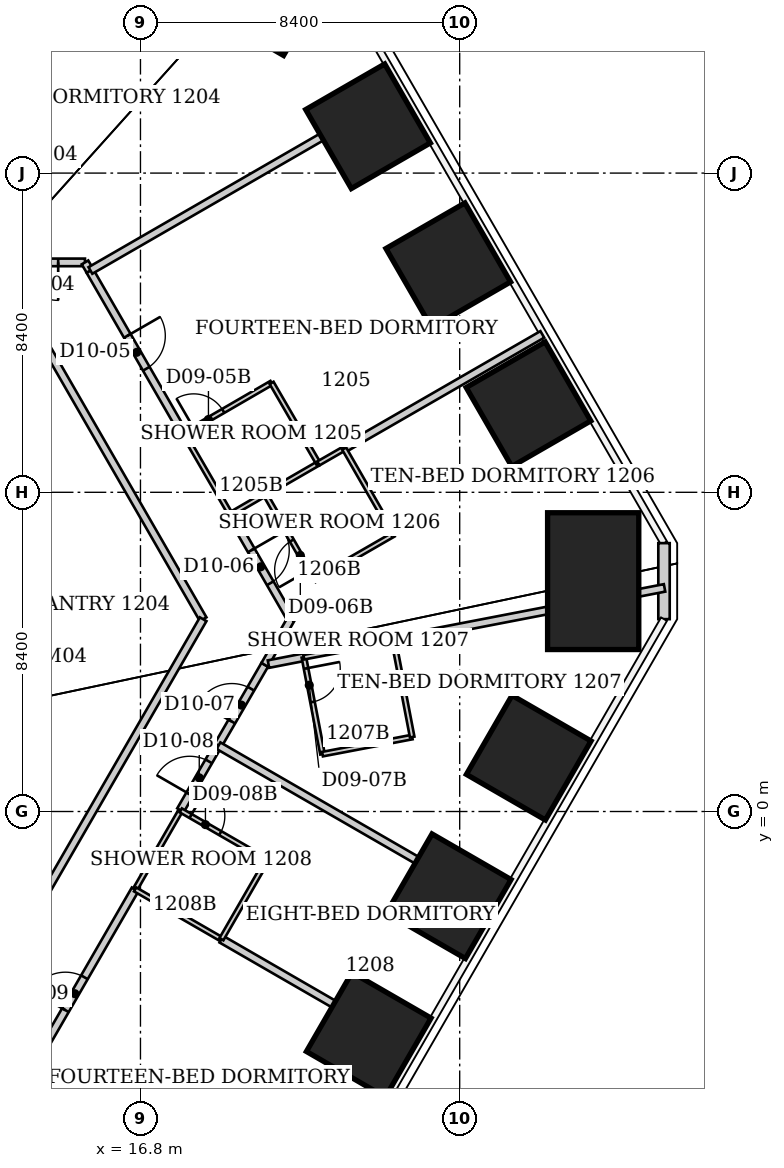
"""IFC4 building model, lengths in metres.
Left out: names, types, materials, properties, quantities, classifications, styles, units other than length and angle.
Written with IfcOpenShell. Run it as: python <this file> out.ifc"""

import sys

from ifc_helpers import new_model, si_unit, direction, frame, frame_2d, origin, origin_2d, place, context, subcontext, project, spatial, rectangle, extrude, clip, halfspace, element, fill, save


model = new_model("IFC4")
c1 = context("Model", 3, precision=1e-05, world=origin(), true_north=direction((0.0, 1.0)))
c2 = subcontext(c1, "Body", "Model", "MODEL_VIEW")
j1 = project(units=[si_unit("LENGTHUNIT", "METRE"), si_unit("PLANEANGLEUNIT", "RADIAN")], contexts=[c1])
p1 = place(None, origin())
s1 = spatial("IfcSite", under=j1, at=p1, CompositionType="ELEMENT")
p2 = place(p1, origin())
s2 = spatial("IfcBuilding", under=s1, at=p2, CompositionType="ELEMENT")
p3 = place(p2, frame((0.0, 0.0, 53.4)))
s3 = spatial("IfcBuildingStorey", under=s2, at=p3, CompositionType="ELEMENT", Elevation=53.4)
p4 = place(p3, frame((19.606, 21.835, 0.0), z_axis=(0.0, 0.0, 1.0), x_axis=(0.5, 0.866025403784, 0.0)))
e1 = element("IfcColumn", 1, at=p4, inside=s3, PredefinedType="COLUMN", context=c2, shape_type="SweptSolid", body=[
    clip(extrude(rectangle(XDim=2.4, YDim=3.6, at=origin_2d()), origin(), (0.0, 0.0, 1.0), 3.726), halfspace(frame((0.0, 0.0, 3.64)), False)),
])
p5 = place(p3, frame((22.788, 18.032, 0.0), z_axis=(0.0, 0.0, 1.0), x_axis=(0.866025403784, 0.5, 0.0)))
e2 = element("IfcColumn", 2, at=p5, inside=s3, PredefinedType="COLUMN", context=c2, shape_type="SweptSolid", body=[
    clip(extrude(rectangle(XDim=2.4, YDim=2.4, at=origin_2d()), origin(), (0.0, 0.0, 1.0), 3.737), halfspace(frame((0.0, 0.0, 3.64)), False)),
])
p6 = place(p3, frame((24.899, 14.375, 0.0), z_axis=(0.0, 0.0, 1.0), x_axis=(0.866025403784, 0.5, 0.0)))
e3 = element("IfcColumn", 3, at=p6, inside=s3, PredefinedType="COLUMN", context=c2, shape_type="SweptSolid", body=[
    clip(extrude(rectangle(XDim=2.4, YDim=2.4, at=origin_2d()), origin(), (0.0, 0.0, 1.0), 3.745), halfspace(frame((0.0, 0.0, 3.64)), False)),
])
p7 = place(p3, frame((27.01, 10.719, 0.0), z_axis=(0.0, 0.0, 1.0), x_axis=(0.866025403784, 0.5, 0.0)))
e4 = element("IfcColumn", 4, at=p7, inside=s3, PredefinedType="COLUMN", context=c2, shape_type="SweptSolid", body=[
    clip(extrude(rectangle(XDim=2.4, YDim=2.4, at=origin_2d()), origin(), (0.0, 0.0, 1.0), 3.737), halfspace(frame((0.0, 0.0, 3.64)), False)),
])
p8 = place(p3, frame((28.713, 6.062, 0.0), z_axis=(0.0, 0.0, 1.0), x_axis=(1.0, 0.0, 0.0)))
e5 = element("IfcColumn", 5, at=p8, inside=s3, PredefinedType="COLUMN", context=c2, shape_type="SweptSolid", body=[
    clip(extrude(rectangle(XDim=2.4, YDim=3.6, at=origin_2d()), origin(), (0.0, 0.0, 1.0), 3.726), halfspace(frame((0.0, 0.0, 3.64)), False)),
])
p9 = place(p3, frame((27.016, 1.416, 0.0), z_axis=(0.0, 0.0, 1.0), x_axis=(0.866025403784, -0.5, 0.0)))
e6 = element("IfcColumn", 6, at=p9, inside=s3, PredefinedType="COLUMN", context=c2, shape_type="SweptSolid", body=[
    clip(extrude(rectangle(XDim=2.4, YDim=2.4, at=origin_2d()), origin(), (0.0, 0.0, 1.0), 3.728), halfspace(frame((0.0, 0.0, 3.64)), False)),
])
p10 = place(p3, frame((24.911, -2.23, 0.0), z_axis=(0.0, 0.0, 1.0), x_axis=(0.866025403784, -0.5, 0.0)))
e7 = element("IfcColumn", 7, at=p10, inside=s3, PredefinedType="COLUMN", context=c2, shape_type="SweptSolid", body=[
    clip(extrude(rectangle(XDim=2.4, YDim=2.4, at=origin_2d()), origin(), (0.0, 0.0, 1.0), 3.736), halfspace(frame((0.0, 0.0, 3.64)), False)),
])
p11 = place(p3, frame((22.806, -5.875, 0.0), z_axis=(0.0, 0.0, 1.0), x_axis=(0.866025403784, -0.5, 0.0)))
e8 = element("IfcColumn", 8, at=p11, inside=s3, PredefinedType="COLUMN", context=c2, shape_type="SweptSolid", body=[
    clip(extrude(rectangle(XDim=2.4, YDim=2.4, at=origin_2d()), origin(), (0.0, 0.0, 1.0), 3.744), halfspace(frame((0.0, 0.0, 3.64)), False)),
])
p12 = place(p3, frame((30.576, 7.062, 0.0), z_axis=(0.0, 0.0, 1.0), x_axis=(0.0, -1.0, 0.0)))
e9 = element("IfcWall", 9, at=p12, inside=s3, PredefinedType="SOLIDWALL", context=c2, shape_type="SweptSolid", body=[
    extrude(rectangle(XDim=2.0, YDim=0.3, at=frame_2d((1.0, 0.0))), origin(), (0.0, 0.0, 1.0), 3.64),
])
p13 = place(p3, frame((13.49, -7.54, 0.0), z_axis=(0.0, 0.0, 1.0), x_axis=(0.500032479136, 0.866006651134, 0.0)))
e10 = element("IfcWall", 10, at=p13, inside=s3, PredefinedType="PARTITIONING", context=c2, shape_type="SweptSolid", body=[
    extrude(rectangle(XDim=6.339, YDim=0.2, at=frame_2d((3.17, 0.0))), origin(), (0.0, 0.0, 1.0), 3.64),
])
p14 = place(p13, frame((2.67, 0.0, 0.0)))
e11 = element("IfcOpeningElement", 11, at=p14, cuts=e10, PredefinedType="OPENING", context=c2, shape_type="SweptSolid", body=[
    extrude(rectangle(XDim=1.0, YDim=2.13, at=frame_2d((0.5, 1.065))), frame((0.0, 0.1, 0.0), z_axis=(0.0, -1.0, 0.0), x_axis=(1.0, 0.0, 0.0)), (0.0, 0.0, 1.0), 0.2),
])
p15 = place(p3, frame((14.19, 12.45, 0.0), z_axis=(0.0, 0.0, 1.0), x_axis=(0.499424260127, -0.866357552282, 0.0)))
e12 = element("IfcWall", 12, at=p15, inside=s3, PredefinedType="PARTITIONING", context=c2, shape_type="SweptSolid", body=[
    extrude(rectangle(XDim=8.53, YDim=0.2, at=frame_2d((4.265, 0.0))), origin(), (0.0, 0.0, 1.0), 3.64),
])
p16 = place(p3, frame((15.34, 14.45, 0.0), z_axis=(0.0, 0.0, 1.0), x_axis=(-1.0, 0.0, 0.0)))
e13 = element("IfcWall", 13, at=p16, inside=s3, PredefinedType="PARTITIONING", context=c2, shape_type="SweptSolid", body=[
    extrude(rectangle(XDim=4.41, YDim=0.2, at=frame_2d((2.205, 0.0))), origin(), (0.0, 0.0, 1.0), 3.64),
])
p17 = place(p16, frame((0.705, 0.0, 0.0)))
e14 = element("IfcOpeningElement", 14, at=p17, cuts=e13, PredefinedType="OPENING", context=c2, shape_type="SweptSolid", body=[
    extrude(rectangle(XDim=1.0, YDim=2.13, at=frame_2d((0.5, 1.065))), frame((0.0, 0.1, 0.0), z_axis=(0.0, -1.0, 0.0), x_axis=(1.0, 0.0, 0.0)), (0.0, 0.0, 1.0), 0.2),
])
p18 = place(p3, frame((15.467, 14.229, 0.0), z_axis=(0.0, 0.0, 1.0), x_axis=(0.499491884095, -0.866318565958, 0.0)))
e15 = element("IfcWall", 15, at=p18, inside=s3, PredefinedType="PARTITIONING", context=c2, shape_type="SweptSolid", body=[
    extrude(rectangle(XDim=4.95, YDim=0.2, at=frame_2d((2.475, 0.0))), origin(), (0.0, 0.0, 1.0), 3.64),
])
p19 = place(p18, frame((1.975, 0.0, 0.0)))
e16 = element("IfcOpeningElement", 16, at=p19, cuts=e15, PredefinedType="OPENING", context=c2, shape_type="SweptSolid", body=[
    extrude(rectangle(XDim=1.0, YDim=2.13, at=frame_2d((0.5, 1.065))), frame((0.0, 0.1, 0.0), z_axis=(0.0, -1.0, 0.0), x_axis=(1.0, 0.0, 0.0)), (0.0, 0.0, 1.0), 0.2),
])
p20 = place(p3, frame((15.47, 14.23, 0.0), z_axis=(0.0, 0.0, 1.0), x_axis=(-0.508439495802, 0.861097717514, 0.0)))
e17 = element("IfcWall", 17, at=p20, inside=s3, PredefinedType="PARTITIONING", context=c2, shape_type="SweptSolid", body=[
    extrude(rectangle(XDim=0.255, YDim=0.2, at=frame_2d((0.128, 0.0))), origin(), (0.0, 0.0, 1.0), 3.64),
])
p21 = place(p3, frame((16.66, -2.05, 0.0), z_axis=(0.0, 0.0, 1.0), x_axis=(0.499693115345, 0.866202511239, 0.0)))
e18 = element("IfcWall", 18, at=p21, inside=s3, PredefinedType="PARTITIONING", context=c2, shape_type="SweptSolid", body=[
    extrude(rectangle(XDim=2.401, YDim=0.12, at=frame_2d((1.201, 0.0))), origin(), (0.0, 0.0, 1.0), 3.64),
])
p22 = place(p3, frame((16.66, -2.05, 0.0), z_axis=(0.0, 0.0, 1.0), x_axis=(0.866010296064, -0.500026166427, 0.0)))
e19 = element("IfcWall", 19, at=p22, inside=s3, PredefinedType="PARTITIONING", context=c2, shape_type="SweptSolid", body=[
    extrude(rectangle(XDim=2.621, YDim=0.12, at=frame_2d((1.311, 0.0))), origin(), (0.0, 0.0, 1.0), 3.64),
])
p23 = place(p3, frame((17.854, 0.033, 0.0), z_axis=(0.0, 0.0, 1.0), x_axis=(0.500308553443, 0.865847187067, 0.0)))
e20 = element("IfcWall", 20, at=p23, inside=s3, PredefinedType="PARTITIONING", context=c2, shape_type="SweptSolid", body=[
    extrude(rectangle(XDim=1.971, YDim=0.2, at=frame_2d((0.985, 0.0))), origin(), (0.0, 0.0, 1.0), 3.64),
])
p24 = place(p23, frame((0.485, 0.0, 0.0)))
e21 = element("IfcOpeningElement", 21, at=p24, cuts=e20, PredefinedType="OPENING", context=c2, shape_type="SweptSolid", body=[
    extrude(rectangle(XDim=1.0, YDim=2.13, at=frame_2d((0.5, 1.065))), frame((0.0, 0.1, 0.0), z_axis=(0.0, -1.0, 0.0), x_axis=(1.0, 0.0, 0.0)), (0.0, 0.0, 1.0), 0.2),
])
p25 = place(p3, frame((17.94, 9.94, 0.0), z_axis=(0.0, 0.0, 1.0), x_axis=(0.50162119259, -0.865087382375, 0.0)))
e22 = element("IfcWall", 22, at=p25, inside=s3, PredefinedType="PARTITIONING", context=c2, shape_type="SweptSolid", body=[
    extrude(rectangle(XDim=2.451, YDim=0.12, at=frame_2d((1.226, 0.0))), origin(), (0.0, 0.0, 1.0), 3.64),
])
p26 = place(p3, frame((18.45, 5.06, 0.0), z_axis=(0.0, 0.0, 1.0), x_axis=(-0.499910730718, -0.866076937294, 0.0)))
e23 = element("IfcWall", 23, at=p26, inside=s3, PredefinedType="PARTITIONING", context=c2, shape_type="SweptSolid", body=[
    extrude(rectangle(XDim=14.593, YDim=0.2, at=frame_2d((7.296, 0.0))), origin(), (0.0, 0.0, 1.0), 3.64),
])
p27 = place(p3, frame((18.84, 1.74, 0.0), z_axis=(0.0, 0.0, 1.0), x_axis=(0.501813488763, 0.864975850817, 0.0)))
e24 = element("IfcWall", 24, at=p27, inside=s3, PredefinedType="PARTITIONING", context=c2, shape_type="SweptSolid", body=[
    extrude(rectangle(XDim=2.451, YDim=0.2, at=frame_2d((1.226, 0.0))), origin(), (0.0, 0.0, 1.0), 3.64),
])
p28 = place(p27, frame((0.726, 0.0, 0.0)))
e25 = element("IfcOpeningElement", 25, at=p28, cuts=e24, PredefinedType="OPENING", context=c2, shape_type="SweptSolid", body=[
    extrude(rectangle(XDim=1.0, YDim=2.13, at=frame_2d((0.5, 1.065))), frame((0.0, 0.1, 0.0), z_axis=(0.0, -1.0, 0.0), x_axis=(1.0, 0.0, 0.0)), (0.0, 0.0, 1.0), 0.2),
])
p29 = place(p3, frame((18.93, -3.361, 0.0), z_axis=(0.0, 0.0, 1.0), x_axis=(0.865985044037, -0.500069898618, 0.0)))
e26 = element("IfcWall", 26, at=p29, inside=s3, PredefinedType="PARTITIONING", context=c2, shape_type="SweptSolid", body=[
    extrude(rectangle(XDim=5.758, YDim=0.2, at=frame_2d((2.879, 0.0))), origin(), (0.0, 0.0, 1.0), 3.64),
])
p30 = place(p3, frame((18.93, -3.36, 0.0), z_axis=(0.0, 0.0, 1.0), x_axis=(0.499693115345, 0.866202511239, 0.0)))
e27 = element("IfcWall", 27, at=p30, inside=s3, PredefinedType="PARTITIONING", context=c2, shape_type="SweptSolid", body=[
    extrude(rectangle(XDim=2.401, YDim=0.12, at=frame_2d((1.201, 0.0))), origin(), (0.0, 0.0, 1.0), 3.64),
])
p31 = place(p3, frame((19.17, 7.82, 0.0), z_axis=(0.0, 0.0, 1.0), x_axis=(0.864148586513, 0.503236743916, 0.0)))
e28 = element("IfcWall", 28, at=p31, inside=s3, PredefinedType="PARTITIONING", context=c2, shape_type="SweptSolid", body=[
    extrude(rectangle(XDim=1.053, YDim=0.12, at=frame_2d((0.527, 0.0))), origin(), (0.0, 0.0, 1.0), 3.64),
])
p32 = place(p3, frame((19.169, 7.82, 0.0), z_axis=(0.0, 0.0, 1.0), x_axis=(0.499379570303, -0.866383312838, 0.0)))
e29 = element("IfcWall", 29, at=p32, inside=s3, PredefinedType="PARTITIONING", context=c2, shape_type="SweptSolid", body=[
    extrude(rectangle(XDim=3.185, YDim=0.2, at=frame_2d((1.593, 0.0))), origin(), (0.0, 0.0, 1.0), 3.64),
])
p33 = place(p32, frame((1.093, 0.0, 0.0)))
e30 = element("IfcOpeningElement", 30, at=p33, cuts=e29, PredefinedType="OPENING", context=c2, shape_type="SweptSolid", body=[
    extrude(rectangle(XDim=1.0, YDim=2.13, at=frame_2d((0.5, 1.065))), frame((0.0, 0.1, 0.0), z_axis=(0.0, -1.0, 0.0), x_axis=(1.0, 0.0, 0.0)), (0.0, 0.0, 1.0), 0.2),
])
p34 = place(p3, frame((20.07, 3.86, 0.0), z_axis=(0.0, 0.0, 1.0), x_axis=(0.49845455473, 0.866915830325, 0.0)))
e31 = element("IfcWall", 31, at=p34, inside=s3, PredefinedType="PARTITIONING", context=c2, shape_type="SweptSolid", body=[
    extrude(rectangle(XDim=1.384, YDim=0.2, at=frame_2d((0.692, 0.0))), origin(), (0.0, 0.0, 1.0), 3.64),
])
p35 = place(p3, frame((20.08, 8.35, 0.0), z_axis=(0.0, 0.0, 1.0), x_axis=(0.498557331759, -0.866856728041, 0.0)))
e32 = element("IfcWall", 32, at=p35, inside=s3, PredefinedType="PARTITIONING", context=c2, shape_type="SweptSolid", body=[
    extrude(rectangle(XDim=2.607, YDim=0.12, at=frame_2d((1.304, 0.0))), origin(), (0.0, 0.0, 1.0), 3.64),
])
p36 = place(p35, frame((1.407, 0.0, 0.0)))
e33 = element("IfcOpeningElement", 33, at=p36, cuts=e32, PredefinedType="OPENING", context=c2, shape_type="SweptSolid", body=[
    extrude(rectangle(XDim=0.9, YDim=2.03, at=frame_2d((0.45, 1.015))), frame((0.0, 0.06, 0.0), z_axis=(0.0, -1.0, 0.0), x_axis=(1.0, 0.0, 0.0)), (0.0, 0.0, 1.0), 0.12),
])
p37 = place(p3, frame((20.08, 8.35, 0.0), z_axis=(0.0, 0.0, 1.0), x_axis=(0.86577060138, 0.500441071242, 0.0)))
e34 = element("IfcWall", 34, at=p37, inside=s3, PredefinedType="PARTITIONING", context=c2, shape_type="SweptSolid", body=[
    extrude(rectangle(XDim=1.617, YDim=0.12, at=frame_2d((0.809, 0.0))), origin(), (0.0, 0.0, 1.0), 3.64),
])
p38 = place(p3, frame((20.13, -1.28, 0.0), z_axis=(0.0, 0.0, 1.0), x_axis=(-0.866114241029, 0.499846097802, 0.0)))
e35 = element("IfcWall", 35, at=p38, inside=s3, PredefinedType="PARTITIONING", context=c2, shape_type="SweptSolid", body=[
    extrude(rectangle(XDim=2.621, YDim=0.12, at=frame_2d((1.311, 0.0))), origin(), (0.0, 0.0, 1.0), 3.64),
])
p39 = place(p38, frame((1.421, 0.0, 0.0)))
e36 = element("IfcOpeningElement", 36, at=p39, cuts=e35, PredefinedType="OPENING", context=c2, shape_type="SweptSolid", body=[
    extrude(rectangle(XDim=0.9, YDim=2.03, at=frame_2d((0.45, 1.015))), frame((0.0, 0.06, 0.0), z_axis=(0.0, -1.0, 0.0), x_axis=(1.0, 0.0, 0.0)), (0.0, 0.0, 1.0), 0.12),
])
p40 = place(p3, frame((20.168, 3.879, 0.0), z_axis=(0.0, 0.0, 1.0), x_axis=(0.981663556765, 0.190621775567, 0.0)))
e37 = element("IfcWall", 37, at=p40, inside=s3, PredefinedType="PARTITIONING", context=c2, shape_type="SweptSolid", body=[
    extrude(rectangle(XDim=0.949, YDim=0.2, at=frame_2d((0.475, 0.0))), origin(), (0.0, 0.0, 1.0), 3.64),
])
p41 = place(p3, frame((20.25, 11.28, 0.0), z_axis=(0.0, 0.0, 1.0), x_axis=(-0.86498992408, -0.501789229896, 0.0)))
e38 = element("IfcWall", 38, at=p41, inside=s3, PredefinedType="PARTITIONING", context=c2, shape_type="SweptSolid", body=[
    extrude(rectangle(XDim=2.671, YDim=0.12, at=frame_2d((1.335, 0.0))), origin(), (0.0, 0.0, 1.0), 3.64),
])
p42 = place(p41, frame((1.47, 0.0, 0.0)))
e39 = element("IfcOpeningElement", 39, at=p42, cuts=e38, PredefinedType="OPENING", context=c2, shape_type="SweptSolid", body=[
    extrude(rectangle(XDim=0.9, YDim=2.03, at=frame_2d((0.45, 1.015))), frame((0.0, 0.06, 0.0), z_axis=(0.0, -1.0, 0.0), x_axis=(1.0, 0.0, 0.0)), (0.0, 0.0, 1.0), 0.12),
])
p43 = place(p3, frame((21.1, 4.06, 0.0), z_axis=(0.0, 0.0, 1.0), x_axis=(0.188697442844, -0.982035271802, 0.0)))
e40 = element("IfcWall", 40, at=p43, inside=s3, PredefinedType="PARTITIONING", context=c2, shape_type="SweptSolid", body=[
    extrude(rectangle(XDim=2.597, YDim=0.12, at=frame_2d((1.298, 0.0))), origin(), (0.0, 0.0, 1.0), 3.64),
])
p44 = place(p43, frame((0.3, 0.0, 0.0)))
e41 = element("IfcOpeningElement", 41, at=p44, cuts=e40, PredefinedType="OPENING", context=c2, shape_type="SweptSolid", body=[
    extrude(rectangle(XDim=0.9, YDim=2.03, at=frame_2d((0.45, 1.015))), frame((0.0, 0.06, 0.0), z_axis=(0.0, -1.0, 0.0), x_axis=(1.0, 0.0, 0.0)), (0.0, 0.0, 1.0), 0.12),
])
p45 = place(p3, frame((21.1, 4.06, 0.0), z_axis=(0.0, 0.0, 1.0), x_axis=(0.982307423658, 0.187275533444, 0.0)))
e42 = element("IfcWall", 42, at=p45, inside=s3, PredefinedType="PARTITIONING", context=c2, shape_type="SweptSolid", body=[
    extrude(rectangle(XDim=2.403, YDim=0.12, at=frame_2d((1.201, 0.0))), origin(), (0.0, 0.0, 1.0), 3.64),
])
p46 = place(p3, frame((21.38, 6.09, 0.0), z_axis=(0.0, 0.0, 1.0), x_axis=(0.866202511239, 0.499693115345, 0.0)))
e43 = element("IfcWall", 43, at=p46, inside=s3, PredefinedType="PARTITIONING", context=c2, shape_type="SweptSolid", body=[
    extrude(rectangle(XDim=2.401, YDim=0.12, at=frame_2d((1.201, 0.0))), origin(), (0.0, 0.0, 1.0), 3.64),
])
p47 = place(p3, frame((21.48, 9.16, 0.0), z_axis=(0.0, 0.0, 1.0), x_axis=(-0.501813488763, 0.864975850817, 0.0)))
e44 = element("IfcWall", 44, at=p47, inside=s3, PredefinedType="PARTITIONING", context=c2, shape_type="SweptSolid", body=[
    extrude(rectangle(XDim=2.451, YDim=0.12, at=frame_2d((1.226, 0.0))), origin(), (0.0, 0.0, 1.0), 3.64),
])
p48 = place(p3, frame((21.48, 9.159, 0.0), z_axis=(0.0, 0.0, 1.0), x_axis=(0.867013943985, 0.498283875853, 0.0)))
e45 = element("IfcWall", 45, at=p48, inside=s3, PredefinedType="PARTITIONING", context=c2, shape_type="SweptSolid", body=[
    extrude(rectangle(XDim=0.784, YDim=0.12, at=frame_2d((0.392, 0.0))), origin(), (0.0, 0.0, 1.0), 3.64),
])
p49 = place(p3, frame((21.59, 1.51, 0.0), z_axis=(0.0, 0.0, 1.0), x_axis=(0.982303859288, 0.187294228499, 0.0)))
e46 = element("IfcWall", 46, at=p49, inside=s3, PredefinedType="PARTITIONING", context=c2, shape_type="SweptSolid", body=[
    extrude(rectangle(XDim=2.402, YDim=0.12, at=frame_2d((1.201, 0.0))), origin(), (0.0, 0.0, 1.0), 3.64),
])
p50 = place(p3, frame((22.16, 9.55, 0.0), z_axis=(0.0, 0.0, 1.0), x_axis=(0.866419851117, 0.499316173973, 0.0)))
e47 = element("IfcWall", 47, at=p50, inside=s3, PredefinedType="PARTITIONING", context=c2, shape_type="SweptSolid", body=[
    extrude(rectangle(XDim=6.018, YDim=0.2, at=frame_2d((3.009, 0.0))), origin(), (0.0, 0.0, 1.0), 3.64),
])
p51 = place(p3, frame((23.46, 4.51, 0.0), z_axis=(0.0, 0.0, 1.0), x_axis=(0.981929870864, 0.189245155035, 0.0)))
e48 = element("IfcWall", 48, at=p51, inside=s3, PredefinedType="PARTITIONING", context=c2, shape_type="SweptSolid", body=[
    extrude(rectangle(XDim=7.262, YDim=0.2, at=frame_2d((3.631, 0.0))), origin(), (0.0, 0.0, 1.0), 3.64),
])
p52 = place(p3, frame((23.46, 7.29, 0.0), z_axis=(0.0, 0.0, 1.0), x_axis=(-0.498627694264, 0.866816256489, 0.0)))
e49 = element("IfcWall", 49, at=p52, inside=s3, PredefinedType="PARTITIONING", context=c2, shape_type="SweptSolid", body=[
    extrude(rectangle(XDim=2.607, YDim=0.12, at=frame_2d((1.304, 0.0))), origin(), (0.0, 0.0, 1.0), 3.64),
])
p53 = place(p3, frame((23.596, 18.92, 0.0), z_axis=(0.0, 0.0, 1.0), x_axis=(-0.866103566674, -0.499864593459, 0.0)))
e50 = element("IfcWall", 50, at=p53, inside=s3, PredefinedType="PARTITIONING", context=c2, shape_type="SweptSolid", body=[
    extrude(rectangle(XDim=9.367, YDim=0.2, at=frame_2d((4.684, 0.0))), origin(), (0.0, 0.0, 1.0), 3.64),
])
p54 = place(p3, frame((23.95, 1.96, 0.0), z_axis=(0.0, 0.0, 1.0), x_axis=(-0.188697442844, 0.982035271802, 0.0)))
e51 = element("IfcWall", 51, at=p54, inside=s3, PredefinedType="PARTITIONING", context=c2, shape_type="SweptSolid", body=[
    extrude(rectangle(XDim=2.597, YDim=0.12, at=frame_2d((1.298, 0.0))), origin(), (0.0, 0.0, 1.0), 3.64),
])
p55 = place(p3, frame((26.096, -2.45, 0.0), z_axis=(0.0, 0.0, 1.0), x_axis=(-0.865997946826, 0.500047553832, 0.0)))
e52 = element("IfcWall", 52, at=p55, inside=s3, PredefinedType="PARTITIONING", context=c2, shape_type="SweptSolid", body=[
    extrude(rectangle(XDim=8.364, YDim=0.2, at=frame_2d((4.182, 0.0))), origin(), (0.0, 0.0, 1.0), 3.64),
])
p56 = place(p17, origin())
e53 = element("IfcDoor", 53, at=p56, inside=s3, OperationType="SINGLE_SWING_LEFT", PredefinedType="DOOR", context=c2, shape_type="SweptSolid", body=[
    extrude(rectangle(XDim=1.0, YDim=2.13, at=frame_2d((0.5, 1.065))), frame((0.0, 0.025, 0.0), z_axis=(0.0, -1.0, 0.0), x_axis=(1.0, 0.0, 0.0)), (0.0, 0.0, 1.0), 0.05),
])
fill(e14, e53)
p57 = place(p19, origin())
e54 = element("IfcDoor", 54, at=p57, inside=s3, OperationType="SINGLE_SWING_LEFT", PredefinedType="DOOR", context=c2, shape_type="SweptSolid", body=[
    extrude(rectangle(XDim=1.0, YDim=2.13, at=frame_2d((0.5, 1.065))), frame((0.0, 0.025, 0.0), z_axis=(0.0, -1.0, 0.0), x_axis=(1.0, 0.0, 0.0)), (0.0, 0.0, 1.0), 0.05),
])
fill(e16, e54)
p58 = place(p42, origin())
e55 = element("IfcDoor", 55, at=p58, inside=s3, OperationType="SINGLE_SWING_RIGHT", PredefinedType="DOOR", context=c2, shape_type="SweptSolid", body=[
    extrude(rectangle(XDim=0.9, YDim=2.03, at=frame_2d((0.45, 1.015))), frame((0.0, 0.025, 0.0), z_axis=(0.0, -1.0, 0.0), x_axis=(1.0, 0.0, 0.0)), (0.0, 0.0, 1.0), 0.05),
])
fill(e39, e55)
p59 = place(p33, origin())
e56 = element("IfcDoor", 56, at=p59, inside=s3, OperationType="SINGLE_SWING_LEFT", PredefinedType="DOOR", context=c2, shape_type="SweptSolid", body=[
    extrude(rectangle(XDim=1.0, YDim=2.13, at=frame_2d((0.5, 1.065))), frame((0.0, 0.025, 0.0), z_axis=(0.0, -1.0, 0.0), x_axis=(1.0, 0.0, 0.0)), (0.0, 0.0, 1.0), 0.05),
])
fill(e30, e56)
p60 = place(p36, origin())
e57 = element("IfcDoor", 57, at=p60, inside=s3, OperationType="SINGLE_SWING_RIGHT", PredefinedType="DOOR", context=c2, shape_type="SweptSolid", body=[
    extrude(rectangle(XDim=0.9, YDim=2.03, at=frame_2d((0.45, 1.015))), frame((0.0, 0.025, 0.0), z_axis=(0.0, -1.0, 0.0), x_axis=(1.0, 0.0, 0.0)), (0.0, 0.0, 1.0), 0.05),
])
fill(e33, e57)
p61 = place(p28, origin())
e58 = element("IfcDoor", 58, at=p61, inside=s3, OperationType="SINGLE_SWING_LEFT", PredefinedType="DOOR", context=c2, shape_type="SweptSolid", body=[
    extrude(rectangle(XDim=1.0, YDim=2.13, at=frame_2d((0.5, 1.065))), frame((0.0, 0.025, 0.0), z_axis=(0.0, -1.0, 0.0), x_axis=(1.0, 0.0, 0.0)), (0.0, 0.0, 1.0), 0.05),
])
fill(e25, e58)
p62 = place(p44, origin())
e59 = element("IfcDoor", 59, at=p62, inside=s3, OperationType="SINGLE_SWING_LEFT", PredefinedType="DOOR", context=c2, shape_type="SweptSolid", body=[
    extrude(rectangle(XDim=0.9, YDim=2.03, at=frame_2d((0.45, 1.015))), frame((0.0, 0.025, 0.0), z_axis=(0.0, -1.0, 0.0), x_axis=(1.0, 0.0, 0.0)), (0.0, 0.0, 1.0), 0.05),
])
fill(e41, e59)
p63 = place(p24, origin())
e60 = element("IfcDoor", 60, at=p63, inside=s3, OperationType="SINGLE_SWING_LEFT", PredefinedType="DOOR", context=c2, shape_type="SweptSolid", body=[
    extrude(rectangle(XDim=1.0, YDim=2.13, at=frame_2d((0.5, 1.065))), frame((0.0, 0.025, 0.0), z_axis=(0.0, -1.0, 0.0), x_axis=(1.0, 0.0, 0.0)), (0.0, 0.0, 1.0), 0.05),
])
fill(e21, e60)
p64 = place(p39, origin())
e61 = element("IfcDoor", 61, at=p64, inside=s3, OperationType="SINGLE_SWING_RIGHT", PredefinedType="DOOR", context=c2, shape_type="SweptSolid", body=[
    extrude(rectangle(XDim=0.9, YDim=2.03, at=frame_2d((0.45, 1.015))), frame((0.0, 0.025, 0.0), z_axis=(0.0, -1.0, 0.0), x_axis=(1.0, 0.0, 0.0)), (0.0, 0.0, 1.0), 0.05),
])
fill(e36, e61)
p65 = place(p14, origin())
e62 = element("IfcDoor", 62, at=p65, inside=s3, OperationType="SINGLE_SWING_LEFT", PredefinedType="DOOR", context=c2, shape_type="SweptSolid", body=[
    extrude(rectangle(XDim=1.0, YDim=2.13, at=frame_2d((0.5, 1.065))), frame((0.0, 0.025, 0.0), z_axis=(0.0, -1.0, 0.0), x_axis=(1.0, 0.0, 0.0)), (0.0, 0.0, 1.0), 0.05),
])
fill(e11, e62)
save(model, sys.argv[1])
